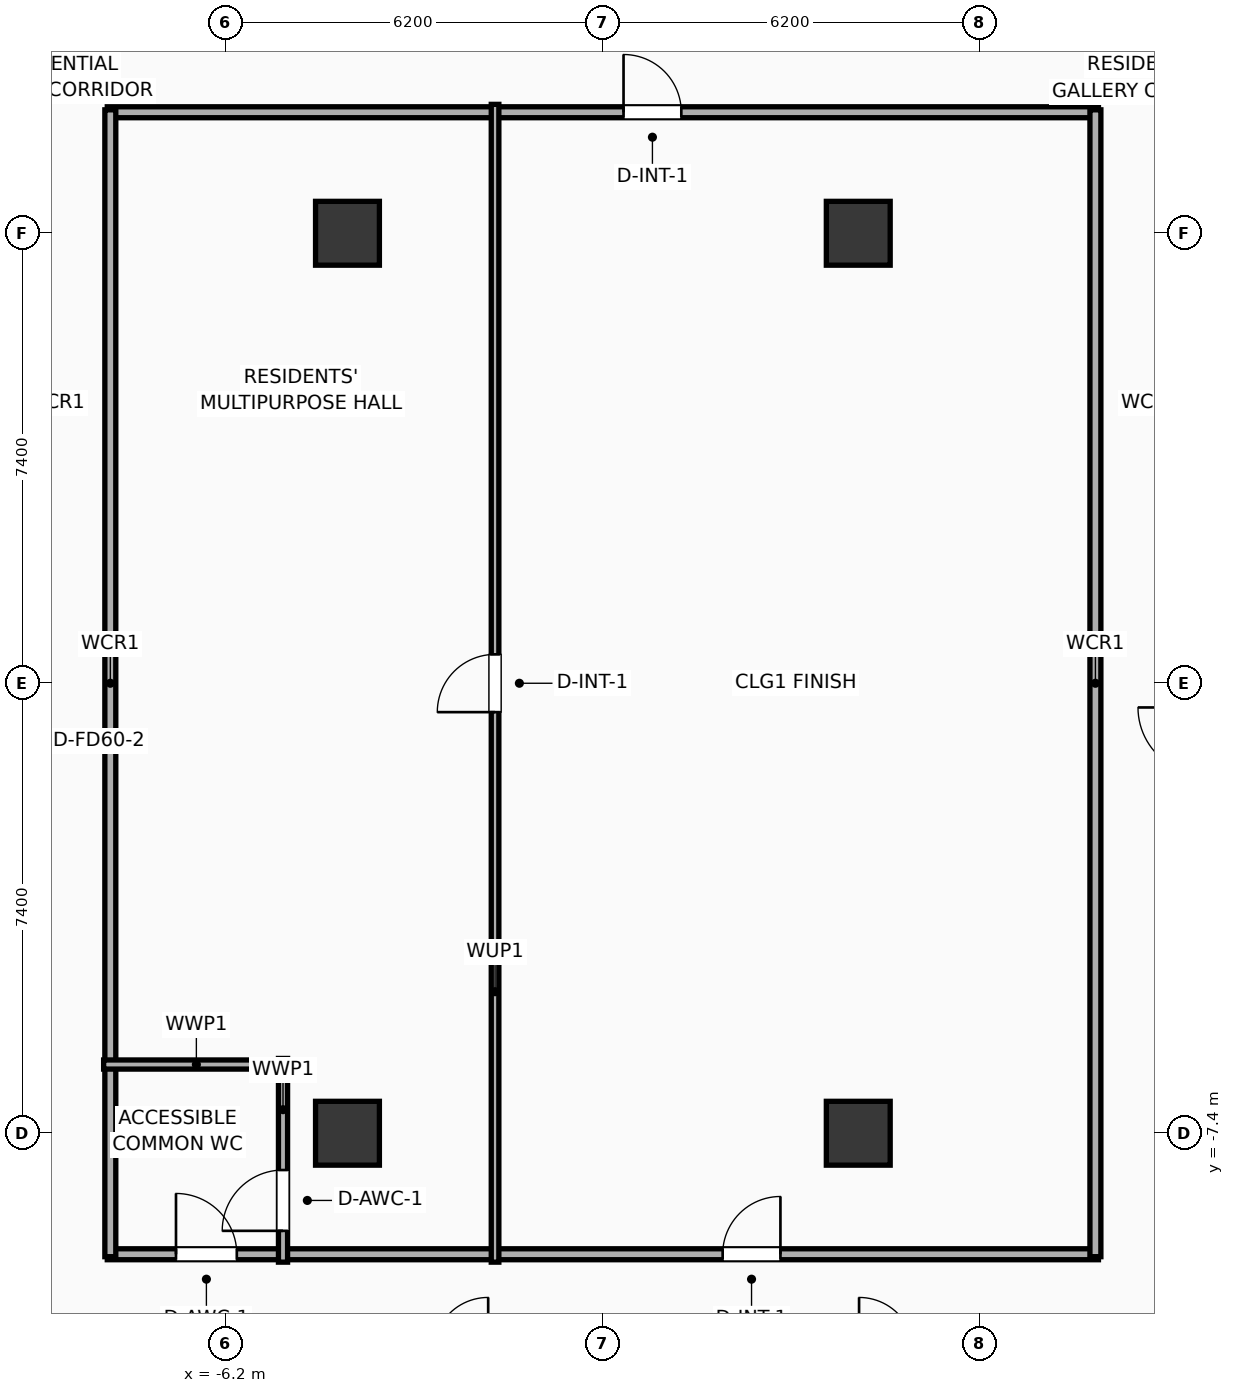
"""IFC4 building model, lengths in metres.
Left out: names, types, materials, properties, quantities, classifications, styles, units other than length and angle.
Written with IfcOpenShell. Run it as: python <this file> out.ifc"""

import sys

from ifc_helpers import new_model, si_unit, direction, frame, frame_2d, origin, origin_2d, place, context, subcontext, project, spatial, rectangle, extrude, element, fill, save


model = new_model("IFC4")
c1 = context("Model", 3, precision=1e-05, world=origin(), true_north=direction((0.0, 1.0)))
c2 = subcontext(c1, "Body", "Model", "MODEL_VIEW")
j1 = project(units=[si_unit("LENGTHUNIT", "METRE"), si_unit("PLANEANGLEUNIT", "RADIAN")], contexts=[c1])
p1 = place(None, origin())
s1 = spatial("IfcSite", under=j1, at=p1, CompositionType="ELEMENT")
p2 = place(p1, origin())
s2 = spatial("IfcBuilding", under=s1, at=p2, CompositionType="ELEMENT")
p3 = place(p2, frame((0.0, 0.0, 65.0)))
s3 = spatial("IfcBuildingStorey", under=s2, at=p3, CompositionType="ELEMENT", Elevation=65.0)
for number, where, z_axis, x_axis in (
    (1, (-4.2, -7.4, 0.0), (0.0, 0.0, 1.0), (1.0, 0.0, 0.0)),
    (2, (-4.2, 7.4, 0.0), (0.0, 0.0, 1.0), (1.0, 0.0, 0.0)),
    (3, (4.2, -7.4, 0.0), (0.0, 0.0, 1.0), (1.0, 0.0, 0.0)),
    (4, (4.2, 7.4, 0.0), (0.0, 0.0, 1.0), (1.0, 0.0, 0.0)),
):
    element("IfcColumn", number, at=place(p3, frame(where, z_axis=z_axis, x_axis=x_axis)), inside=s3, PredefinedType="COLUMN", context=c2, shape_type="SweptSolid", body=[
        extrude(rectangle(XDim=1.05, YDim=1.05, at=origin_2d()), origin(), (0.0, 0.0, 1.0), 3.9),
    ])
p4 = place(p3, frame((-8.15, 9.39, 0.0), z_axis=(0.0, 0.0, 1.0), x_axis=(1.0, 0.0, 0.0)))
e5 = element("IfcWall", 5, at=p4, inside=s3, PredefinedType="PARTITIONING", context=c2, shape_type="SweptSolid", body=[
    extrude(rectangle(XDim=16.3, YDim=0.18, at=frame_2d((8.15, 0.0))), origin(), (0.0, 0.0, 1.0), 3.65),
])
p5 = place(p4, frame((8.49, 0.0, 0.0)))
e6 = element("IfcOpeningElement", 6, at=p5, cuts=e5, PredefinedType="OPENING", context=c2, shape_type="SweptSolid", body=[
    extrude(rectangle(XDim=0.95, YDim=2.05, at=frame_2d((0.475, 1.025))), frame((0.0, 0.1, 0.0), z_axis=(0.0, -1.0, 0.0), x_axis=(1.0, 0.0, 0.0)), (0.0, 0.0, 1.0), 0.2),
])
p6 = place(p3, frame((-8.15, -9.39, 0.0), z_axis=(0.0, 0.0, 1.0), x_axis=(1.0, 0.0, 0.0)))
e7 = element("IfcWall", 7, at=p6, inside=s3, PredefinedType="PARTITIONING", context=c2, shape_type="SweptSolid", body=[
    extrude(rectangle(XDim=16.3, YDim=0.18, at=frame_2d((8.15, 0.0))), origin(), (0.0, 0.0, 1.0), 3.65),
])
p7 = place(p6, frame((1.13, 0.0, 0.0)))
e8 = element("IfcOpeningElement", 8, at=p7, cuts=e7, PredefinedType="OPENING", context=c2, shape_type="SweptSolid", body=[
    extrude(rectangle(XDim=1.0, YDim=2.05, at=frame_2d((0.5, 1.025))), frame((0.0, 0.1, 0.0), z_axis=(0.0, -1.0, 0.0), x_axis=(1.0, 0.0, 0.0)), (0.0, 0.0, 1.0), 0.2),
])
p8 = place(p6, frame((10.12, 0.0, 0.0)))
e9 = element("IfcOpeningElement", 9, at=p8, cuts=e7, PredefinedType="OPENING", context=c2, shape_type="SweptSolid", body=[
    extrude(rectangle(XDim=0.95, YDim=2.05, at=frame_2d((0.475, 1.025))), frame((0.0, 0.1, 0.0), z_axis=(0.0, -1.0, 0.0), x_axis=(1.0, 0.0, 0.0)), (0.0, 0.0, 1.0), 0.2),
])
for number, where, z_axis, x_axis in (
    (10, (-8.1, -9.43, 0.0), (0.0, 0.0, 1.0), (0.0, 1.0, 0.0)),
    (11, (8.1, -9.43, 0.0), (0.0, 0.0, 1.0), (0.0, 1.0, 0.0)),
):
    element("IfcWall", number, at=place(p3, frame(where, z_axis=z_axis, x_axis=x_axis)), inside=s3, PredefinedType="PARTITIONING", context=c2, shape_type="SweptSolid", body=[
        extrude(rectangle(XDim=18.86, YDim=0.18, at=frame_2d((9.43, 0.0))), origin(), (0.0, 0.0, 1.0), 3.65),
    ])
p9 = place(p3, frame((-5.26, -9.52, 0.0), z_axis=(0.0, 0.0, 1.0), x_axis=(0.0, 1.0, 0.0)))
e12 = element("IfcWall", 12, at=p9, inside=s3, PredefinedType="PLUMBINGWALL", context=c2, shape_type="SweptSolid", body=[
    extrude(rectangle(XDim=3.35, YDim=0.15, at=frame_2d((1.675, 0.0))), origin(), (0.0, 0.0, 1.0), 3.65),
])
p10 = place(p9, frame((0.515, 0.0, 0.0)))
e13 = element("IfcOpeningElement", 13, at=p10, cuts=e12, PredefinedType="OPENING", context=c2, shape_type="SweptSolid", body=[
    extrude(rectangle(XDim=1.0, YDim=2.05, at=frame_2d((0.5, 1.025))), frame((0.0, 0.085, 0.0), z_axis=(0.0, -1.0, 0.0), x_axis=(1.0, 0.0, 0.0)), (0.0, 0.0, 1.0), 0.17),
])
p11 = place(p3, frame((-8.21, -6.27, 0.0), z_axis=(0.0, 0.0, 1.0), x_axis=(1.0, 0.0, 0.0)))
e14 = element("IfcWall", 14, at=p11, inside=s3, PredefinedType="PLUMBINGWALL", context=c2, shape_type="SweptSolid", body=[
    extrude(rectangle(XDim=3.05, YDim=0.15, at=frame_2d((1.525, 0.0))), origin(), (0.0, 0.0, 1.0), 3.65),
])
p12 = place(p3, frame((-1.773, -9.52, 0.0), z_axis=(0.0, 0.0, 1.0), x_axis=(0.0, 1.0, 0.0)))
e15 = element("IfcWall", 15, at=p12, inside=s3, PredefinedType="PARTITIONING", context=c2, shape_type="SweptSolid", body=[
    extrude(rectangle(XDim=19.04, YDim=0.125, at=frame_2d((9.52, 0.0))), origin(), (0.0, 0.0, 1.0), 3.65),
])
p13 = place(p12, frame((9.045, 0.0, 0.0)))
e16 = element("IfcOpeningElement", 16, at=p13, cuts=e15, PredefinedType="OPENING", context=c2, shape_type="SweptSolid", body=[
    extrude(rectangle(XDim=0.95, YDim=2.05, at=frame_2d((0.475, 1.025))), frame((0.0, 0.073, 0.0), z_axis=(0.0, -1.0, 0.0), x_axis=(1.0, 0.0, 0.0)), (0.0, 0.0, 1.0), 0.145),
])
p14 = place(p5, origin())
e17 = element("IfcDoor", 17, at=p14, inside=s3, OperationType="SINGLE_SWING_LEFT", PredefinedType="DOOR", context=c2, shape_type="SweptSolid", body=[
    extrude(rectangle(XDim=0.95, YDim=2.05, at=frame_2d((0.475, 1.025))), frame((0.0, 0.025, 0.0), z_axis=(0.0, -1.0, 0.0), x_axis=(1.0, 0.0, 0.0)), (0.0, 0.0, 1.0), 0.05),
])
fill(e6, e17)
p15 = place(p7, origin())
e18 = element("IfcDoor", 18, at=p15, inside=s3, OperationType="SINGLE_SWING_LEFT", PredefinedType="DOOR", context=c2, shape_type="SweptSolid", body=[
    extrude(rectangle(XDim=1.0, YDim=2.05, at=frame_2d((0.5, 1.025))), frame((0.0, 0.025, 0.0), z_axis=(0.0, -1.0, 0.0), x_axis=(1.0, 0.0, 0.0)), (0.0, 0.0, 1.0), 0.05),
])
fill(e8, e18)
p16 = place(p8, origin())
e19 = element("IfcDoor", 19, at=p16, inside=s3, OperationType="SINGLE_SWING_RIGHT", PredefinedType="DOOR", context=c2, shape_type="SweptSolid", body=[
    extrude(rectangle(XDim=0.95, YDim=2.05, at=frame_2d((0.475, 1.025))), frame((0.0, 0.025, 0.0), z_axis=(0.0, -1.0, 0.0), x_axis=(1.0, 0.0, 0.0)), (0.0, 0.0, 1.0), 0.05),
])
fill(e9, e19)
p17 = place(p10, origin())
e20 = element("IfcDoor", 20, at=p17, inside=s3, OperationType="SINGLE_SWING_LEFT", PredefinedType="DOOR", context=c2, shape_type="SweptSolid", body=[
    extrude(rectangle(XDim=1.0, YDim=2.05, at=frame_2d((0.5, 1.025))), frame((0.0, 0.025, 0.0), z_axis=(0.0, -1.0, 0.0), x_axis=(1.0, 0.0, 0.0)), (0.0, 0.0, 1.0), 0.05),
])
fill(e13, e20)
p18 = place(p13, origin())
e21 = element("IfcDoor", 21, at=p18, inside=s3, OperationType="SINGLE_SWING_LEFT", PredefinedType="DOOR", context=c2, shape_type="SweptSolid", body=[
    extrude(rectangle(XDim=0.95, YDim=2.05, at=frame_2d((0.475, 1.025))), frame((0.0, 0.025, 0.0), z_axis=(0.0, -1.0, 0.0), x_axis=(1.0, 0.0, 0.0)), (0.0, 0.0, 1.0), 0.05),
])
fill(e16, e21)
save(model, sys.argv[1])
